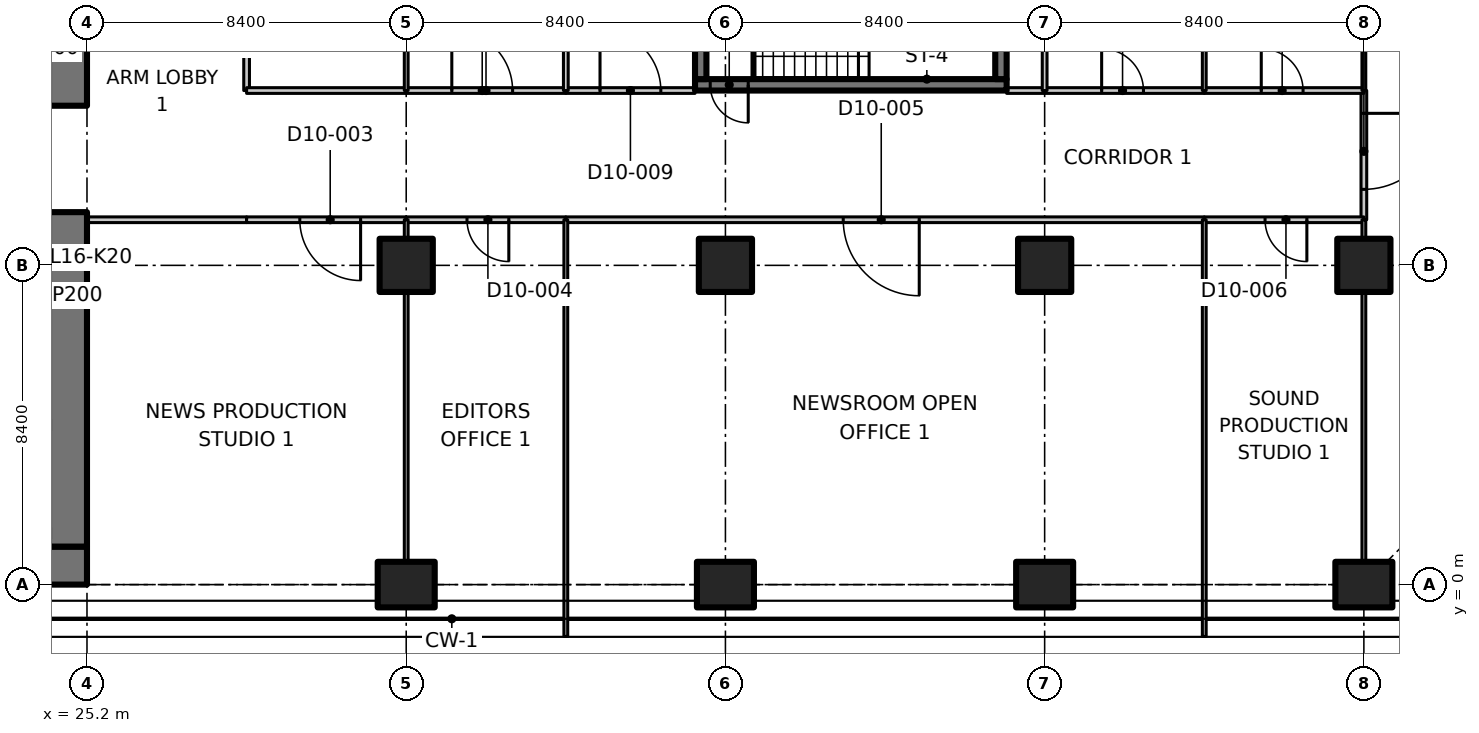
"""IFC4 building model, lengths in metres.
Left out: names, types, materials, properties, quantities, classifications, styles, units other than length and angle.
Written with IfcOpenShell. Run it as: python <this file> out.ifc"""

import sys

from ifc_helpers import new_model, si_unit, direction, frame, frame_2d, origin, origin_2d, place, context, subcontext, project, spatial, polyline, rectangle, outline, extrude, element, fill, save


model = new_model("IFC4")
c1 = context("Model", 3, precision=1e-05, world=origin(), true_north=direction((0.0, 1.0)))
c2 = subcontext(c1, "Body", "Model", "MODEL_VIEW")
j1 = project(units=[si_unit("LENGTHUNIT", "METRE"), si_unit("PLANEANGLEUNIT", "RADIAN")], contexts=[c1])
p1 = place(None, origin())
s1 = spatial("IfcSite", under=j1, at=p1, CompositionType="ELEMENT")
p2 = place(p1, origin())
s2 = spatial("IfcBuilding", under=s1, at=p2, CompositionType="ELEMENT")
p3 = place(p2, frame((0.0, 0.0, 72.5)))
s3 = spatial("IfcBuildingStorey", under=s2, at=p3, CompositionType="ELEMENT", Elevation=72.5)
p4 = place(p3, frame((33.6, 0.0, 0.0), z_axis=(0.0, 0.0, 1.0), x_axis=(0.0, 1.0, 0.0)))
e1 = element("IfcColumn", 1, at=p4, inside=s3, PredefinedType="COLUMN", context=c2, shape_type="SweptSolid", body=[
    extrude(rectangle(XDim=1.2, YDim=1.5, at=origin_2d()), origin(), (0.0, 0.0, 1.0), 3.35),
])
p5 = place(p3, frame((33.6, 8.4, 0.0), z_axis=(0.0, 0.0, 1.0), x_axis=(1.0, 0.0, 0.0)))
e2 = element("IfcColumn", 2, at=p5, inside=s3, PredefinedType="COLUMN", context=c2, shape_type="SweptSolid", body=[
    extrude(rectangle(XDim=1.4, YDim=1.4, at=origin_2d()), origin(), (0.0, 0.0, 1.0), 3.35),
])
p6 = place(p3, frame((42.0, 0.0, 0.0), z_axis=(0.0, 0.0, 1.0), x_axis=(0.0, 1.0, 0.0)))
e3 = element("IfcColumn", 3, at=p6, inside=s3, PredefinedType="COLUMN", context=c2, shape_type="SweptSolid", body=[
    extrude(rectangle(XDim=1.2, YDim=1.5, at=origin_2d()), origin(), (0.0, 0.0, 1.0), 3.35),
])
p7 = place(p3, frame((42.0, 8.4, 0.0), z_axis=(0.0, 0.0, 1.0), x_axis=(1.0, 0.0, 0.0)))
e4 = element("IfcColumn", 4, at=p7, inside=s3, PredefinedType="COLUMN", context=c2, shape_type="SweptSolid", body=[
    extrude(rectangle(XDim=1.4, YDim=1.4, at=origin_2d()), origin(), (0.0, 0.0, 1.0), 3.35),
])
p8 = place(p3, frame((50.4, 0.0, 0.0), z_axis=(0.0, 0.0, 1.0), x_axis=(0.0, 1.0, 0.0)))
e5 = element("IfcColumn", 5, at=p8, inside=s3, PredefinedType="COLUMN", context=c2, shape_type="SweptSolid", body=[
    extrude(rectangle(XDim=1.2, YDim=1.5, at=origin_2d()), origin(), (0.0, 0.0, 1.0), 3.35),
])
p9 = place(p3, frame((50.4, 8.4, 0.0), z_axis=(0.0, 0.0, 1.0), x_axis=(1.0, 0.0, 0.0)))
e6 = element("IfcColumn", 6, at=p9, inside=s3, PredefinedType="COLUMN", context=c2, shape_type="SweptSolid", body=[
    extrude(rectangle(XDim=1.4, YDim=1.4, at=origin_2d()), origin(), (0.0, 0.0, 1.0), 3.35),
])
p10 = place(p3, frame((58.8, 0.0, 0.0), z_axis=(0.0, 0.0, 1.0), x_axis=(0.0, 1.0, 0.0)))
e7 = element("IfcColumn", 7, at=p10, inside=s3, PredefinedType="COLUMN", context=c2, shape_type="SweptSolid", body=[
    extrude(rectangle(XDim=1.2, YDim=1.5, at=origin_2d()), origin(), (0.0, 0.0, 1.0), 3.35),
])
p11 = place(p3, frame((58.8, 8.4, 0.0), z_axis=(0.0, 0.0, 1.0), x_axis=(1.0, 0.0, 0.0)))
e8 = element("IfcColumn", 8, at=p11, inside=s3, PredefinedType="COLUMN", context=c2, shape_type="SweptSolid", body=[
    extrude(rectangle(XDim=1.4, YDim=1.4, at=origin_2d()), origin(), (0.0, 0.0, 1.0), 3.35),
])
p12 = place(p3, frame((6.936, 0.5, 0.0), z_axis=(0.0, 0.0, 1.0), x_axis=(1.0, 0.0, 0.0)))
e9 = element("IfcWall", 9, at=p12, inside=s3, PredefinedType="SHEAR", context=c2, shape_type="SweptSolid", body=[
    extrude(rectangle(XDim=18.264, YDim=1.0, at=frame_2d((9.132, 0.0))), origin(), (0.0, 0.0, 1.0), 3.35),
])
p13 = place(p3, frame((24.7, 1.0, 0.0), z_axis=(0.0, 0.0, 1.0), x_axis=(0.0, 1.0, 0.0)))
e10 = element("IfcWall", 10, at=p13, inside=s3, PredefinedType="SHEAR", context=c2, shape_type="SweptSolid", body=[
    extrude(rectangle(XDim=8.8, YDim=1.0, at=frame_2d((4.4, 0.0))), origin(), (0.0, 0.0, 1.0), 3.35),
])
p14 = place(p3, frame((24.7, 12.6, 0.0), z_axis=(0.0, 0.0, 1.0), x_axis=(0.0, 1.0, 0.0)))
e11 = element("IfcWall", 11, at=p14, inside=s3, PredefinedType="SHEAR", context=c2, shape_type="SweptSolid", body=[
    extrude(rectangle(XDim=3.2, YDim=1.0, at=frame_2d((1.6, 0.0))), origin(), (0.0, 0.0, 1.0), 3.35),
])
p15 = place(p3, frame((49.4, 13.15, 0.0), z_axis=(0.0, 0.0, 1.0), x_axis=(-1.0, 0.0, 0.0)))
e12 = element("IfcWall", 12, at=p15, inside=s3, PredefinedType="SHEAR", context=c2, shape_type="SweptSolid", body=[
    extrude(rectangle(XDim=8.2, YDim=0.3, at=frame_2d((4.1, 0.0))), origin(), (0.0, 0.0, 1.0), 3.35),
])
p16 = place(p15, frame((6.8, 0.0, 0.0)))
e13 = element("IfcOpeningElement", 13, at=p16, cuts=e12, PredefinedType="OPENING", context=c2, shape_type="SweptSolid", body=[
    extrude(rectangle(XDim=1.0, YDim=2.1, at=frame_2d((0.5, 1.05))), frame((0.0, 0.16, 0.0), z_axis=(0.0, -1.0, 0.0), x_axis=(1.0, 0.0, 0.0)), (0.0, 0.0, 1.0), 0.32),
])
for number, where, z_axis, x_axis in (
    (14, (41.35, 13.3, 0.0), (0.0, 0.0, 1.0), (0.0, 1.0, 0.0)),
    (15, (49.25, 13.3, 0.0), (0.0, 0.0, 1.0), (0.0, 1.0, 0.0)),
):
    element("IfcWall", number, at=place(p3, frame(where, z_axis=z_axis, x_axis=x_axis)), inside=s3, PredefinedType="SHEAR", context=c2, shape_type="SweptSolid", body=[
        extrude(rectangle(XDim=2.55, YDim=0.3, at=frame_2d((1.275, 0.0))), origin(), (0.0, 0.0, 1.0), 3.35),
    ])
p17 = place(p3, frame((29.4, 9.6, 0.0), z_axis=(0.0, 0.0, 1.0), x_axis=(-1.0, 0.0, 0.0)))
e16 = element("IfcWall", 16, at=p17, inside=s3, PredefinedType="PARTITIONING", context=c2, shape_type="SweptSolid", body=[
    extrude(rectangle(XDim=4.2, YDim=0.15, at=frame_2d((2.1, 0.0))), origin(), (0.0, 0.0, 1.0), 3.33),
])
p18 = place(p3, frame((29.4, 21.2, 0.0), z_axis=(0.0, 0.0, 1.0), x_axis=(0.0, -1.0, 0.0)))
e17 = element("IfcWall", 17, at=p18, inside=s3, PredefinedType="PARTITIONING", context=c2, shape_type="SweptSolid", body=[
    extrude(rectangle(XDim=8.2, YDim=0.15, at=frame_2d((4.1, 0.0))), origin(), (0.0, 0.0, 1.0), 3.33),
])
p19 = place(p18, frame((3.3, 0.0, 0.0)))
e18 = element("IfcOpeningElement", 18, at=p19, cuts=e17, PredefinedType="OPENING", context=c2, shape_type="SweptSolid", body=[
    extrude(rectangle(XDim=1.6, YDim=2.1, at=frame_2d((0.8, 1.05))), frame((0.0, 0.085, 0.0), z_axis=(0.0, -1.0, 0.0), x_axis=(1.0, 0.0, 0.0)), (0.0, 0.0, 1.0), 0.17),
])
p20 = place(p3, frame((58.8, 13.0, 0.0), z_axis=(0.0, 0.0, 1.0), x_axis=(0.0, -1.0, 0.0)))
e19 = element("IfcWall", 19, at=p20, inside=s3, PredefinedType="PARTITIONING", context=c2, shape_type="SweptSolid", body=[
    extrude(rectangle(XDim=3.4, YDim=0.15, at=frame_2d((1.7, 0.0))), origin(), (0.0, 0.0, 1.0), 3.33),
])
p21 = place(p20, frame((0.6, 0.0, 0.0)))
e20 = element("IfcOpeningElement", 20, at=p21, cuts=e19, PredefinedType="OPENING", context=c2, shape_type="SweptSolid", body=[
    extrude(rectangle(XDim=2.0, YDim=2.4, at=frame_2d((1.0, 1.2))), frame((0.0, 0.085, 0.0), z_axis=(0.0, -1.0, 0.0), x_axis=(1.0, 0.0, 0.0)), (0.0, 0.0, 1.0), 0.17),
])
p22 = place(p3, frame((33.6, 9.6, 0.0), z_axis=(0.0, 0.0, 1.0), x_axis=(-1.0, 0.0, 0.0)))
e21 = element("IfcWall", 21, at=p22, inside=s3, PredefinedType="PARTITIONING", context=c2, shape_type="SweptSolid", body=[
    extrude(rectangle(XDim=4.2, YDim=0.15, at=frame_2d((2.1, 0.0))), origin(), (0.0, 0.0, 1.0), 3.33),
])
p23 = place(p22, frame((1.2, 0.0, 0.0)))
e22 = element("IfcOpeningElement", 22, at=p23, cuts=e21, PredefinedType="OPENING", context=c2, shape_type="SweptSolid", body=[
    extrude(rectangle(XDim=1.6, YDim=2.1, at=frame_2d((0.8, 1.05))), frame((0.0, 0.085, 0.0), z_axis=(0.0, -1.0, 0.0), x_axis=(1.0, 0.0, 0.0)), (0.0, 0.0, 1.0), 0.17),
])
p24 = place(p3, frame((37.8, 9.6, 0.0), z_axis=(0.0, 0.0, 1.0), x_axis=(-1.0, 0.0, 0.0)))
e23 = element("IfcWall", 23, at=p24, inside=s3, PredefinedType="PARTITIONING", context=c2, shape_type="SweptSolid", body=[
    extrude(rectangle(XDim=4.2, YDim=0.15, at=frame_2d((2.1, 0.0))), origin(), (0.0, 0.0, 1.0), 3.33),
])
p25 = place(p24, frame((1.5, 0.0, 0.0)))
e24 = element("IfcOpeningElement", 24, at=p25, cuts=e23, PredefinedType="OPENING", context=c2, shape_type="SweptSolid", body=[
    extrude(rectangle(XDim=1.1, YDim=2.1, at=frame_2d((0.55, 1.05))), frame((0.0, 0.085, 0.0), z_axis=(0.0, -1.0, 0.0), x_axis=(1.0, 0.0, 0.0)), (0.0, 0.0, 1.0), 0.17),
])
p26 = place(p3, frame((54.6, 9.6, 0.0), z_axis=(0.0, 0.0, 1.0), x_axis=(-1.0, 0.0, 0.0)))
e25 = element("IfcWall", 25, at=p26, inside=s3, PredefinedType="PARTITIONING", context=c2, shape_type="SweptSolid", body=[
    extrude(rectangle(XDim=16.8, YDim=0.15, at=frame_2d((8.4, 0.0))), origin(), (0.0, 0.0, 1.0), 3.33),
])
p27 = place(p26, frame((7.5, 0.0, 0.0)))
e26 = element("IfcOpeningElement", 26, at=p27, cuts=e25, PredefinedType="OPENING", context=c2, shape_type="SweptSolid", body=[
    extrude(rectangle(XDim=2.0, YDim=2.4, at=frame_2d((1.0, 1.2))), frame((0.0, 0.085, 0.0), z_axis=(0.0, -1.0, 0.0), x_axis=(1.0, 0.0, 0.0)), (0.0, 0.0, 1.0), 0.17),
])
p28 = place(p3, frame((58.8, 9.6, 0.0), z_axis=(0.0, 0.0, 1.0), x_axis=(-1.0, 0.0, 0.0)))
e27 = element("IfcWall", 27, at=p28, inside=s3, PredefinedType="PARTITIONING", context=c2, shape_type="SweptSolid", body=[
    extrude(rectangle(XDim=4.2, YDim=0.15, at=frame_2d((2.1, 0.0))), origin(), (0.0, 0.0, 1.0), 3.33),
])
p29 = place(p28, frame((1.5, 0.0, 0.0)))
e28 = element("IfcOpeningElement", 28, at=p29, cuts=e27, PredefinedType="OPENING", context=c2, shape_type="SweptSolid", body=[
    extrude(rectangle(XDim=1.1, YDim=2.1, at=frame_2d((0.55, 1.05))), frame((0.0, 0.085, 0.0), z_axis=(0.0, -1.0, 0.0), x_axis=(1.0, 0.0, 0.0)), (0.0, 0.0, 1.0), 0.17),
])
p30 = place(p3, frame((29.4, 13.0, 0.0), z_axis=(0.0, 0.0, 1.0), x_axis=(1.0, 0.0, 0.0)))
e29 = element("IfcWall", 29, at=p30, inside=s3, PredefinedType="PARTITIONING", context=c2, shape_type="SweptSolid", body=[
    extrude(rectangle(XDim=4.2, YDim=0.15, at=frame_2d((2.1, 0.0))), origin(), (0.0, 0.0, 1.0), 3.33),
])
p31 = place(p3, frame((33.6, 13.0, 0.0), z_axis=(0.0, 0.0, 1.0), x_axis=(1.0, 0.0, 0.0)))
e30 = element("IfcWall", 30, at=p31, inside=s3, PredefinedType="PARTITIONING", context=c2, shape_type="SweptSolid", body=[
    extrude(rectangle(XDim=4.2, YDim=0.15, at=frame_2d((2.1, 0.0))), origin(), (0.0, 0.0, 1.0), 3.33),
])
p32 = place(p31, frame((1.2, 0.0, 0.0)))
e31 = element("IfcOpeningElement", 31, at=p32, cuts=e30, PredefinedType="OPENING", context=c2, shape_type="SweptSolid", body=[
    extrude(rectangle(XDim=1.6, YDim=2.1, at=frame_2d((0.8, 1.05))), frame((0.0, 0.085, 0.0), z_axis=(0.0, -1.0, 0.0), x_axis=(1.0, 0.0, 0.0)), (0.0, 0.0, 1.0), 0.17),
])
p33 = place(p3, frame((37.8, 13.0, 0.0), z_axis=(0.0, 0.0, 1.0), x_axis=(1.0, 0.0, 0.0)))
e32 = element("IfcWall", 32, at=p33, inside=s3, PredefinedType="PARTITIONING", context=c2, shape_type="SweptSolid", body=[
    extrude(rectangle(XDim=3.4, YDim=0.15, at=frame_2d((1.7, 0.0))), origin(), (0.0, 0.0, 1.0), 3.33),
])
p34 = place(p33, frame((0.9, 0.0, 0.0)))
e33 = element("IfcOpeningElement", 33, at=p34, cuts=e32, PredefinedType="OPENING", context=c2, shape_type="SweptSolid", body=[
    extrude(rectangle(XDim=1.6, YDim=2.1, at=frame_2d((0.8, 1.05))), frame((0.0, 0.085, 0.0), z_axis=(0.0, -1.0, 0.0), x_axis=(1.0, 0.0, 0.0)), (0.0, 0.0, 1.0), 0.17),
])
p35 = place(p3, frame((49.4, 13.0, 0.0), z_axis=(0.0, 0.0, 1.0), x_axis=(1.0, 0.0, 0.0)))
e34 = element("IfcWall", 34, at=p35, inside=s3, PredefinedType="PARTITIONING", context=c2, shape_type="SweptSolid", body=[
    extrude(rectangle(XDim=1.0, YDim=0.15, at=frame_2d((0.5, 0.0))), origin(), (0.0, 0.0, 1.0), 3.33),
])
p36 = place(p3, frame((50.4, 13.0, 0.0), z_axis=(0.0, 0.0, 1.0), x_axis=(1.0, 0.0, 0.0)))
e35 = element("IfcWall", 35, at=p36, inside=s3, PredefinedType="PARTITIONING", context=c2, shape_type="SweptSolid", body=[
    extrude(rectangle(XDim=4.2, YDim=0.15, at=frame_2d((2.1, 0.0))), origin(), (0.0, 0.0, 1.0), 3.33),
])
p37 = place(p36, frame((1.5, 0.0, 0.0)))
e36 = element("IfcOpeningElement", 36, at=p37, cuts=e35, PredefinedType="OPENING", context=c2, shape_type="SweptSolid", body=[
    extrude(rectangle(XDim=1.1, YDim=2.1, at=frame_2d((0.55, 1.05))), frame((0.0, 0.085, 0.0), z_axis=(0.0, -1.0, 0.0), x_axis=(1.0, 0.0, 0.0)), (0.0, 0.0, 1.0), 0.17),
])
p38 = place(p3, frame((54.6, 13.0, 0.0), z_axis=(0.0, 0.0, 1.0), x_axis=(1.0, 0.0, 0.0)))
e37 = element("IfcWall", 37, at=p38, inside=s3, PredefinedType="PARTITIONING", context=c2, shape_type="SweptSolid", body=[
    extrude(rectangle(XDim=4.2, YDim=0.15, at=frame_2d((2.1, 0.0))), origin(), (0.0, 0.0, 1.0), 3.33),
])
p39 = place(p38, frame((1.5, 0.0, 0.0)))
e38 = element("IfcOpeningElement", 38, at=p39, cuts=e37, PredefinedType="OPENING", context=c2, shape_type="SweptSolid", body=[
    extrude(rectangle(XDim=1.1, YDim=2.1, at=frame_2d((0.55, 1.05))), frame((0.0, 0.085, 0.0), z_axis=(0.0, -1.0, 0.0), x_axis=(1.0, 0.0, 0.0)), (0.0, 0.0, 1.0), 0.17),
])
p40 = place(p3, frame((58.8, 0.62, 0.0), z_axis=(0.0, 0.0, 1.0), x_axis=(0.0, 1.0, 0.0)))
e39 = element("IfcWall", 39, at=p40, inside=s3, PredefinedType="PARTITIONING", context=c2, shape_type="SweptSolid", body=[
    extrude(rectangle(XDim=7.06, YDim=0.1, at=frame_2d((3.53, 0.0))), origin(), (0.0, 0.0, 1.0), 3.33),
])
p41 = place(p3, frame((58.8, 9.12, 0.0), z_axis=(0.0, 0.0, 1.0), x_axis=(0.0, 1.0, 0.0)))
e40 = element("IfcWall", 40, at=p41, inside=s3, PredefinedType="PARTITIONING", context=c2, shape_type="SweptSolid", body=[
    extrude(rectangle(XDim=0.48, YDim=0.1, at=frame_2d((0.24, 0.0))), origin(), (0.0, 0.0, 1.0), 3.33),
])
p42 = place(p3, frame((58.8, 13.0, 0.0), z_axis=(0.0, 0.0, 1.0), x_axis=(0.0, 1.0, 0.0)))
e41 = element("IfcWall", 41, at=p42, inside=s3, PredefinedType="PARTITIONING", context=c2, shape_type="SweptSolid", body=[
    extrude(rectangle(XDim=3.08, YDim=0.1, at=frame_2d((1.54, 0.0))), origin(), (0.0, 0.0, 1.0), 3.33),
])
p43 = place(p3, frame((33.6, 9.6, 0.0), z_axis=(0.0, 0.0, 1.0), x_axis=(0.0, -1.0, 0.0)))
e42 = element("IfcWall", 42, at=p43, inside=s3, PredefinedType="PARTITIONING", context=c2, shape_type="SweptSolid", body=[
    extrude(rectangle(XDim=0.48, YDim=0.1, at=frame_2d((0.24, 0.0))), origin(), (0.0, 0.0, 1.0), 3.33),
])
p44 = place(p3, frame((33.6, 7.68, 0.0), z_axis=(0.0, 0.0, 1.0), x_axis=(0.0, -1.0, 0.0)))
e43 = element("IfcWall", 43, at=p44, inside=s3, PredefinedType="PARTITIONING", context=c2, shape_type="SweptSolid", body=[
    extrude(rectangle(XDim=7.06, YDim=0.1, at=frame_2d((3.53, 0.0))), origin(), (0.0, 0.0, 1.0), 3.33),
])
for number, where, z_axis, x_axis in (
    (44, (37.8, 9.6, 0.0), (0.0, 0.0, 1.0), (0.0, -1.0, 0.0)),
    (45, (54.6, 9.6, 0.0), (0.0, 0.0, 1.0), (0.0, -1.0, 0.0)),
):
    element("IfcWall", number, at=place(p3, frame(where, z_axis=z_axis, x_axis=x_axis)), inside=s3, PredefinedType="PARTITIONING", context=c2, shape_type="SweptSolid", body=[
        extrude(outline(polyline([(0.0, 0.0), (10.965, 0.0), (10.965, 3.33), (10.7, 3.33), (10.05, 3.33), (10.048, 2.98), (9.152, 2.98), (9.15, 3.33), (0.0, 3.33), (0.0, 0.0)])), frame((0.0, 0.05, 0.0), z_axis=(0.0, -1.0, 0.0), x_axis=(1.0, 0.0, 0.0)), (0.0, 0.0, 1.0), 0.1),
    ])
p45 = place(p3, frame((33.6, 16.08, 0.0), z_axis=(0.0, 0.0, 1.0), x_axis=(0.0, -1.0, 0.0)))
e46 = element("IfcWall", 46, at=p45, inside=s3, PredefinedType="PARTITIONING", context=c2, shape_type="SweptSolid", body=[
    extrude(rectangle(XDim=3.08, YDim=0.1, at=frame_2d((1.54, 0.0))), origin(), (0.0, 0.0, 1.0), 3.33),
])
p46 = place(p3, frame((37.8, 30.243, 0.0), z_axis=(0.0, 0.0, 1.0), x_axis=(0.0, -1.0, 0.0)))
e47 = element("IfcWall", 47, at=p46, inside=s3, PredefinedType="PARTITIONING", context=c2, shape_type="SweptSolid", body=[
    extrude(outline(polyline([(0.0, 0.0), (17.243, 0.0), (17.243, 3.33), (5.493, 3.33), (5.491, 2.98), (4.595, 2.98), (4.593, 3.33), (0.0, 3.33), (0.0, 0.0)])), frame((0.0, 0.062, 0.0), z_axis=(0.0, -1.0, 0.0), x_axis=(1.0, 0.0, 0.0)), (0.0, 0.0, 1.0), 0.125),
])
p47 = place(p3, frame((50.4, 16.08, 0.0), z_axis=(0.0, 0.0, 1.0), x_axis=(0.0, -1.0, 0.0)))
e48 = element("IfcWall", 48, at=p47, inside=s3, PredefinedType="PARTITIONING", context=c2, shape_type="SweptSolid", body=[
    extrude(rectangle(XDim=3.08, YDim=0.125, at=frame_2d((1.54, 0.0))), origin(), (0.0, 0.0, 1.0), 3.33),
])
p48 = place(p3, frame((54.6, 26.374, 0.0), z_axis=(0.0, 0.0, 1.0), x_axis=(0.0, -1.0, 0.0)))
e49 = element("IfcWall", 49, at=p48, inside=s3, PredefinedType="PARTITIONING", context=c2, shape_type="SweptSolid", body=[
    extrude(outline(polyline([(0.0, 0.0), (13.374, 0.0), (13.374, 3.33), (1.624, 3.33), (1.622, 2.98), (0.726, 2.98), (0.724, 3.33), (0.074, 3.33), (0.0, 3.33), (0.0, 0.0)])), frame((0.0, 0.05, 0.0), z_axis=(0.0, -1.0, 0.0), x_axis=(1.0, 0.0, 0.0)), (0.0, 0.0, 1.0), 0.1),
])
p49 = place(p16, origin())
e50 = element("IfcDoor", 50, at=p49, inside=s3, OperationType="SINGLE_SWING_RIGHT", PredefinedType="DOOR", context=c2, shape_type="SweptSolid", body=[
    extrude(rectangle(XDim=1.0, YDim=2.1, at=frame_2d((0.5, 1.05))), frame((0.0, 0.025, 0.0), z_axis=(0.0, -1.0, 0.0), x_axis=(1.0, 0.0, 0.0)), (0.0, 0.0, 1.0), 0.05),
])
fill(e13, e50)
p50 = place(p21, origin())
e51 = element("IfcDoor", 51, at=p50, inside=s3, OperationType="DOUBLE_DOOR_SINGLE_SWING", PredefinedType="DOOR", context=c2, shape_type="SweptSolid", body=[
    extrude(rectangle(XDim=2.0, YDim=2.4, at=frame_2d((1.0, 1.2))), frame((0.0, 0.025, 0.0), z_axis=(0.0, -1.0, 0.0), x_axis=(1.0, 0.0, 0.0)), (0.0, 0.0, 1.0), 0.05),
])
fill(e20, e51)
p51 = place(p23, origin())
e52 = element("IfcDoor", 52, at=p51, inside=s3, OperationType="DOUBLE_DOOR_SINGLE_SWING", PredefinedType="DOOR", context=c2, shape_type="SweptSolid", body=[
    extrude(rectangle(XDim=1.6, YDim=2.1, at=frame_2d((0.8, 1.05))), frame((0.0, 0.025, 0.0), z_axis=(0.0, -1.0, 0.0), x_axis=(1.0, 0.0, 0.0)), (0.0, 0.0, 1.0), 0.05),
])
fill(e22, e52)
p52 = place(p25, origin())
e53 = element("IfcDoor", 53, at=p52, inside=s3, OperationType="SINGLE_SWING_LEFT", PredefinedType="DOOR", context=c2, shape_type="SweptSolid", body=[
    extrude(rectangle(XDim=1.1, YDim=2.1, at=frame_2d((0.55, 1.05))), frame((0.0, 0.025, 0.0), z_axis=(0.0, -1.0, 0.0), x_axis=(1.0, 0.0, 0.0)), (0.0, 0.0, 1.0), 0.05),
])
fill(e24, e53)
p53 = place(p27, origin())
e54 = element("IfcDoor", 54, at=p53, inside=s3, OperationType="DOUBLE_DOOR_SINGLE_SWING", PredefinedType="DOOR", context=c2, shape_type="SweptSolid", body=[
    extrude(rectangle(XDim=2.0, YDim=2.4, at=frame_2d((1.0, 1.2))), frame((0.0, 0.025, 0.0), z_axis=(0.0, -1.0, 0.0), x_axis=(1.0, 0.0, 0.0)), (0.0, 0.0, 1.0), 0.05),
])
fill(e26, e54)
p54 = place(p29, origin())
e55 = element("IfcDoor", 55, at=p54, inside=s3, OperationType="SINGLE_SWING_LEFT", PredefinedType="DOOR", context=c2, shape_type="SweptSolid", body=[
    extrude(rectangle(XDim=1.1, YDim=2.1, at=frame_2d((0.55, 1.05))), frame((0.0, 0.025, 0.0), z_axis=(0.0, -1.0, 0.0), x_axis=(1.0, 0.0, 0.0)), (0.0, 0.0, 1.0), 0.05),
])
fill(e28, e55)
p55 = place(p32, origin())
e56 = element("IfcDoor", 56, at=p55, inside=s3, OperationType="DOUBLE_DOOR_SINGLE_SWING", PredefinedType="DOOR", context=c2, shape_type="SweptSolid", body=[
    extrude(rectangle(XDim=1.6, YDim=2.1, at=frame_2d((0.8, 1.05))), frame((0.0, 0.025, 0.0), z_axis=(0.0, -1.0, 0.0), x_axis=(1.0, 0.0, 0.0)), (0.0, 0.0, 1.0), 0.05),
])
fill(e31, e56)
p56 = place(p34, origin())
e57 = element("IfcDoor", 57, at=p56, inside=s3, OperationType="DOUBLE_DOOR_SINGLE_SWING", PredefinedType="DOOR", context=c2, shape_type="SweptSolid", body=[
    extrude(rectangle(XDim=1.6, YDim=2.1, at=frame_2d((0.8, 1.05))), frame((0.0, 0.025, 0.0), z_axis=(0.0, -1.0, 0.0), x_axis=(1.0, 0.0, 0.0)), (0.0, 0.0, 1.0), 0.05),
])
fill(e33, e57)
p57 = place(p37, origin())
e58 = element("IfcDoor", 58, at=p57, inside=s3, OperationType="SINGLE_SWING_LEFT", PredefinedType="DOOR", context=c2, shape_type="SweptSolid", body=[
    extrude(rectangle(XDim=1.1, YDim=2.1, at=frame_2d((0.55, 1.05))), frame((0.0, 0.025, 0.0), z_axis=(0.0, -1.0, 0.0), x_axis=(1.0, 0.0, 0.0)), (0.0, 0.0, 1.0), 0.05),
])
fill(e36, e58)
p58 = place(p39, origin())
e59 = element("IfcDoor", 59, at=p58, inside=s3, OperationType="SINGLE_SWING_LEFT", PredefinedType="DOOR", context=c2, shape_type="SweptSolid", body=[
    extrude(rectangle(XDim=1.1, YDim=2.1, at=frame_2d((0.55, 1.05))), frame((0.0, 0.025, 0.0), z_axis=(0.0, -1.0, 0.0), x_axis=(1.0, 0.0, 0.0)), (0.0, 0.0, 1.0), 0.05),
])
fill(e38, e59)
save(model, sys.argv[1])
